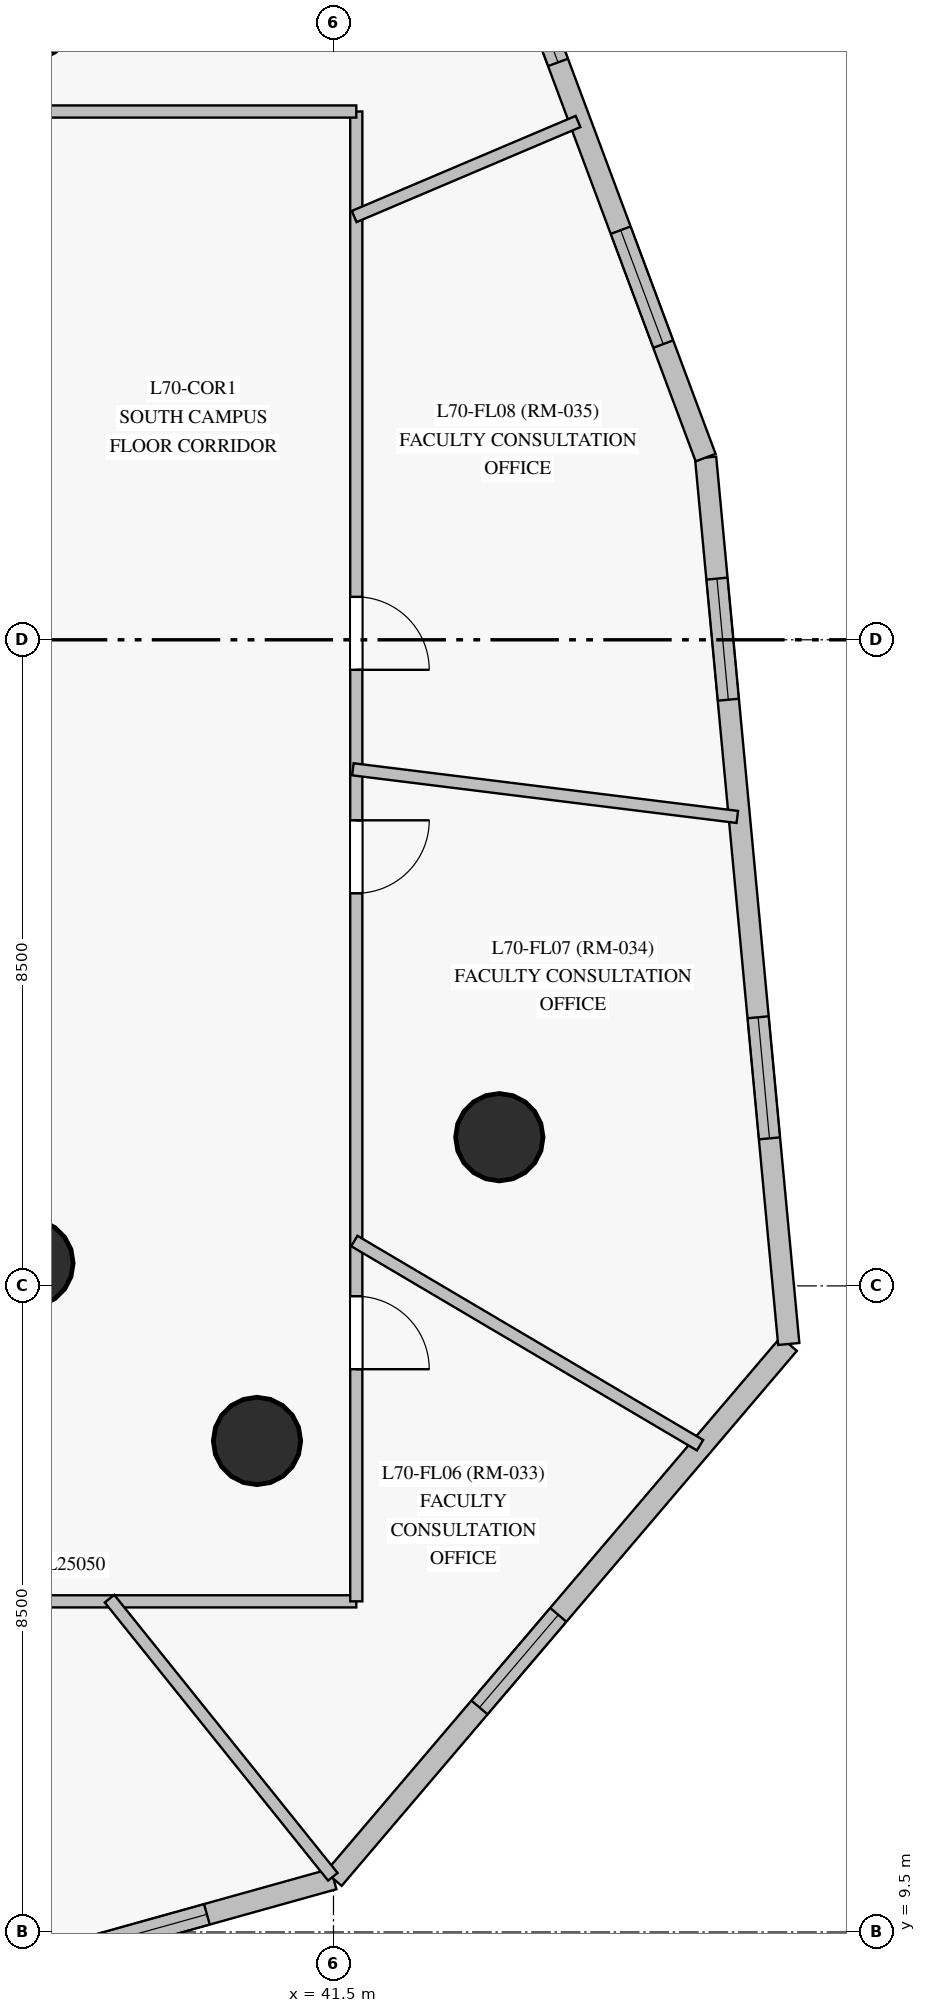
"""IFC4 building model, lengths in metres.
Left out: names, types, materials, properties, quantities, classifications, styles, units other than length and angle.
Written with IfcOpenShell. Run it as: python <this file> out.ifc"""

import sys

from ifc_helpers import new_model, si_unit, direction, frame, frame_2d, origin, origin_with_axes, origin_2d, place, context, subcontext, project, spatial, rectangle, circle, extrude, source, transform, mapped, element, fill, save


model = new_model("IFC4")
c1 = context("Model", 3, precision=1e-05, world=origin(), true_north=direction((0.0, 1.0)))
c2 = subcontext(c1, "Body", "Model", "MODEL_VIEW")
j1 = project(units=[si_unit("LENGTHUNIT", "METRE"), si_unit("PLANEANGLEUNIT", "RADIAN")], contexts=[c1])
p1 = place(None, origin())
s1 = spatial("IfcSite", under=j1, at=p1, CompositionType="ELEMENT")
p2 = place(p1, origin())
s2 = spatial("IfcBuilding", under=s1, at=p2, CompositionType="ELEMENT")
p3 = place(p2, frame((0.0, 0.0, 238.25)))
s3 = spatial("IfcBuildingStorey", under=s2, at=p3, CompositionType="ELEMENT", Elevation=238.25)
m1 = source(origin_with_axes(), c2, "Body", "SweptSolid", [
    extrude(circle(Radius=0.575, at=origin_2d()), origin(), (0.0, 0.0, 1.0), 3.05),
])
for number, where, z_axis, x_axis in (
    (1, (37.5, 18.3, 0.0), (0.0, 0.0, 1.0), (1.0, 0.0, 0.0)),
    (2, (37.5, 34.7, 0.0), (0.0, 0.0, 1.0), (1.0, 0.0, 0.0)),
    (3, (43.682, 19.956, 0.0), (0.0, 0.0, 1.0), (1.0, 0.0, 0.0)),
    (4, (40.494, 15.96, 0.0), (0.0, 0.0, 1.0), (1.0, 0.0, 0.0)),
):
    element("IfcColumn", number, at=place(p3, frame(where, z_axis=z_axis, x_axis=x_axis)), inside=s3, PredefinedType="COLUMN", context=c2, shape_type="MappedRepresentation", body=[
        mapped(m1, transform((0.0, 0.0, 0.0), scale=1.0)),
    ])
p4 = place(p3, frame((29.601, 6.876, 0.0), z_axis=(0.0, 0.0, 1.0), x_axis=(0.963188210112, 0.268827959673, 0.0)))
e5 = element("IfcWall", 5, at=p4, inside=s3, PredefinedType="SOLIDWALL", context=c2, shape_type="SweptSolid", body=[
    extrude(rectangle(XDim=12.355, YDim=0.28, at=frame_2d((6.177, 0.0))), origin(), (0.0, 0.0, 1.0), 2.85),
])
p5 = place(p4, frame((0.757, 0.0, 0.85)))
e6 = element("IfcOpeningElement", 6, at=p5, cuts=e5, PredefinedType="OPENING", context=c2, shape_type="SweptSolid", body=[
    extrude(rectangle(XDim=1.6, YDim=1.6, at=frame_2d((0.8, 0.8))), frame((0.0, 0.15, 0.0), z_axis=(0.0, -1.0, 0.0), x_axis=(1.0, 0.0, 0.0)), (0.0, 0.0, 1.0), 0.3),
])
p6 = place(p4, frame((4.725, 0.0, 0.85)))
e7 = element("IfcOpeningElement", 7, at=p6, cuts=e5, PredefinedType="OPENING", context=c2, shape_type="SweptSolid", body=[
    extrude(rectangle(XDim=1.6, YDim=1.6, at=frame_2d((0.8, 0.8))), frame((0.0, 0.15, 0.0), z_axis=(0.0, -1.0, 0.0), x_axis=(1.0, 0.0, 0.0)), (0.0, 0.0, 1.0), 0.3),
])
p7 = place(p4, frame((9.025, 0.0, 0.85)))
e8 = element("IfcOpeningElement", 8, at=p7, cuts=e5, PredefinedType="OPENING", context=c2, shape_type="SweptSolid", body=[
    extrude(rectangle(XDim=1.6, YDim=1.6, at=frame_2d((0.8, 0.8))), frame((0.0, 0.15, 0.0), z_axis=(0.0, -1.0, 0.0), x_axis=(1.0, 0.0, 0.0)), (0.0, 0.0, 1.0), 0.3),
])
p8 = place(p3, frame((41.501, 10.198, 0.0), z_axis=(0.0, 0.0, 1.0), x_axis=(0.648021806958, 0.761621781271, 0.0)))
e9 = element("IfcWall", 9, at=p8, inside=s3, PredefinedType="SOLIDWALL", context=c2, shape_type="SweptSolid", body=[
    extrude(rectangle(XDim=9.241, YDim=0.28, at=frame_2d((4.621, 0.0))), origin(), (0.0, 0.0, 1.0), 2.85),
])
p9 = place(p8, frame((2.962, 0.0, 0.85)))
e10 = element("IfcOpeningElement", 10, at=p9, cuts=e9, PredefinedType="OPENING", context=c2, shape_type="SweptSolid", body=[
    extrude(rectangle(XDim=1.6, YDim=1.6, at=frame_2d((0.8, 0.8))), frame((0.0, 0.15, 0.0), z_axis=(0.0, -1.0, 0.0), x_axis=(1.0, 0.0, 0.0)), (0.0, 0.0, 1.0), 0.3),
])
p10 = place(p3, frame((47.49, 17.236, 0.0), z_axis=(0.0, 0.0, 1.0), x_axis=(-0.093386555956, 0.995629926814, 0.0)))
e11 = element("IfcWall", 11, at=p10, inside=s3, PredefinedType="SOLIDWALL", context=c2, shape_type="SweptSolid", body=[
    extrude(rectangle(XDim=11.712, YDim=0.28, at=frame_2d((5.856, 0.0))), origin(), (0.0, 0.0, 1.0), 2.85),
])
p11 = place(p10, frame((2.717, 0.0, 0.85)))
e12 = element("IfcOpeningElement", 12, at=p11, cuts=e11, PredefinedType="OPENING", context=c2, shape_type="SweptSolid", body=[
    extrude(rectangle(XDim=1.6, YDim=1.6, at=frame_2d((0.8, 0.8))), frame((0.0, 0.15, 0.0), z_axis=(0.0, -1.0, 0.0), x_axis=(1.0, 0.0, 0.0)), (0.0, 0.0, 1.0), 0.3),
])
p12 = place(p10, frame((8.513, 0.0, 0.85)))
e13 = element("IfcOpeningElement", 13, at=p12, cuts=e11, PredefinedType="OPENING", context=c2, shape_type="SweptSolid", body=[
    extrude(rectangle(XDim=1.6, YDim=1.6, at=frame_2d((0.8, 0.8))), frame((0.0, 0.15, 0.0), z_axis=(0.0, -1.0, 0.0), x_axis=(1.0, 0.0, 0.0)), (0.0, 0.0, 1.0), 0.3),
])
p13 = place(p3, frame((46.396, 28.897, 0.0), z_axis=(0.0, 0.0, 1.0), x_axis=(-0.34987402961, 0.936796756722, 0.0)))
e14 = element("IfcWall", 14, at=p13, inside=s3, PredefinedType="SOLIDWALL", context=c2, shape_type="SweptSolid", body=[
    extrude(rectangle(XDim=8.032, YDim=0.28, at=frame_2d((4.016, 0.0))), origin(), (0.0, 0.0, 1.0), 2.85),
])
p14 = place(p13, frame((1.594, 0.0, 0.85)))
e15 = element("IfcOpeningElement", 15, at=p14, cuts=e14, PredefinedType="OPENING", context=c2, shape_type="SweptSolid", body=[
    extrude(rectangle(XDim=1.6, YDim=1.6, at=frame_2d((0.8, 0.8))), frame((0.0, 0.15, 0.0), z_axis=(0.0, -1.0, 0.0), x_axis=(1.0, 0.0, 0.0)), (0.0, 0.0, 1.0), 0.3),
])
p15 = place(p13, frame((5.55, 0.0, 0.85)))
e16 = element("IfcOpeningElement", 16, at=p15, cuts=e14, PredefinedType="OPENING", context=c2, shape_type="SweptSolid", body=[
    extrude(rectangle(XDim=1.6, YDim=1.6, at=frame_2d((0.8, 0.8))), frame((0.0, 0.15, 0.0), z_axis=(0.0, -1.0, 0.0), x_axis=(1.0, 0.0, 0.0)), (0.0, 0.0, 1.0), 0.3),
])
p16 = place(p3, frame((41.8, 13.85, 0.0), z_axis=(0.0, 0.0, 1.0), x_axis=(-1.0, 0.0, 0.0)))
e17 = element("IfcWall", 17, at=p16, inside=s3, PredefinedType="PARTITIONING", context=c2, shape_type="SweptSolid", body=[
    extrude(rectangle(XDim=25.05, YDim=0.16, at=frame_2d((12.525, 0.0))), origin(), (0.0, 0.0, 1.0), 2.3),
])
p17 = place(p16, frame((18.312, 0.0, 0.0)))
e18 = element("IfcOpeningElement", 18, at=p17, cuts=e17, PredefinedType="OPENING", context=c2, shape_type="SweptSolid", body=[
    extrude(rectangle(XDim=0.96, YDim=2.15, at=frame_2d((0.48, 1.075))), frame((0.0, 0.09, 0.0), z_axis=(0.0, -1.0, 0.0), x_axis=(1.0, 0.0, 0.0)), (0.0, 0.0, 1.0), 0.18),
])
p18 = place(p16, frame((12.05, 0.0, 0.0)))
e19 = element("IfcOpeningElement", 19, at=p18, cuts=e17, PredefinedType="OPENING", context=c2, shape_type="SweptSolid", body=[
    extrude(rectangle(XDim=0.96, YDim=2.15, at=frame_2d((0.48, 1.075))), frame((0.0, 0.09, 0.0), z_axis=(0.0, -1.0, 0.0), x_axis=(1.0, 0.0, 0.0)), (0.0, 0.0, 1.0), 0.18),
])
p19 = place(p16, frame((8.292, 0.0, 0.0)))
e20 = element("IfcOpeningElement", 20, at=p19, cuts=e17, PredefinedType="OPENING", context=c2, shape_type="SweptSolid", body=[
    extrude(rectangle(XDim=0.96, YDim=2.15, at=frame_2d((0.48, 1.075))), frame((0.0, 0.09, 0.0), z_axis=(0.0, -1.0, 0.0), x_axis=(1.0, 0.0, 0.0)), (0.0, 0.0, 1.0), 0.18),
])
p20 = place(p3, frame((41.8, 33.45, 0.0), z_axis=(0.0, 0.0, 1.0), x_axis=(0.0, -1.0, 0.0)))
e21 = element("IfcWall", 21, at=p20, inside=s3, PredefinedType="PARTITIONING", context=c2, shape_type="SweptSolid", body=[
    extrude(rectangle(XDim=19.6, YDim=0.16, at=frame_2d((9.8, 0.0))), origin(), (0.0, 0.0, 1.0), 2.3),
])
p21 = place(p20, frame((15.586, 0.0, 0.0)))
e22 = element("IfcOpeningElement", 22, at=p21, cuts=e21, PredefinedType="OPENING", context=c2, shape_type="SweptSolid", body=[
    extrude(rectangle(XDim=0.96, YDim=2.15, at=frame_2d((0.48, 1.075))), frame((0.0, 0.09, 0.0), z_axis=(0.0, -1.0, 0.0), x_axis=(1.0, 0.0, 0.0)), (0.0, 0.0, 1.0), 0.18),
])
p22 = place(p20, frame((9.325, 0.0, 0.0)))
e23 = element("IfcOpeningElement", 23, at=p22, cuts=e21, PredefinedType="OPENING", context=c2, shape_type="SweptSolid", body=[
    extrude(rectangle(XDim=0.96, YDim=2.15, at=frame_2d((0.48, 1.075))), frame((0.0, 0.09, 0.0), z_axis=(0.0, -1.0, 0.0), x_axis=(1.0, 0.0, 0.0)), (0.0, 0.0, 1.0), 0.18),
])
p23 = place(p20, frame((6.385, 0.0, 0.0)))
e24 = element("IfcOpeningElement", 24, at=p23, cuts=e21, PredefinedType="OPENING", context=c2, shape_type="SweptSolid", body=[
    extrude(rectangle(XDim=0.96, YDim=2.15, at=frame_2d((0.48, 1.075))), frame((0.0, 0.09, 0.0), z_axis=(0.0, -1.0, 0.0), x_axis=(1.0, 0.0, 0.0)), (0.0, 0.0, 1.0), 0.18),
])
p24 = place(p3, frame((41.774, 18.591, 0.0), z_axis=(0.0, 0.0, 1.0), x_axis=(0.861040600517, -0.508536217256, 0.0)))
e25 = element("IfcWall", 25, at=p24, inside=s3, PredefinedType="PARTITIONING", context=c2, shape_type="SweptSolid", body=[
    extrude(rectangle(XDim=5.282, YDim=0.16, at=frame_2d((2.641, 0.0))), origin(), (0.0, 0.0, 1.0), 2.85),
])
p25 = place(p3, frame((41.755, 24.796, 0.0), z_axis=(0.0, 0.0, 1.0), x_axis=(0.992404123025, -0.123020553578, 0.0)))
e26 = element("IfcWall", 26, at=p25, inside=s3, PredefinedType="PARTITIONING", context=c2, shape_type="SweptSolid", body=[
    extrude(rectangle(XDim=5.096, YDim=0.16, at=frame_2d((2.548, 0.0))), origin(), (0.0, 0.0, 1.0), 2.85),
])
p26 = place(p3, frame((38.553, 13.885, 0.0), z_axis=(0.0, 0.0, 1.0), x_axis=(0.626159620149, -0.779694895517, 0.0)))
e27 = element("IfcWall", 27, at=p26, inside=s3, PredefinedType="PARTITIONING", context=c2, shape_type="SweptSolid", body=[
    extrude(rectangle(XDim=4.692, YDim=0.16, at=frame_2d((2.346, 0.0))), origin(), (0.0, 0.0, 1.0), 2.85),
])
p27 = place(p3, frame((37.682, 33.45, 0.0), z_axis=(0.0, 0.0, 1.0), x_axis=(1.0, 0.0, 0.0)))
e28 = element("IfcWall", 28, at=p27, inside=s3, PredefinedType="PARTITIONING", context=c2, shape_type="SweptSolid", body=[
    extrude(rectangle(XDim=4.118, YDim=0.16, at=frame_2d((2.059, 0.0))), origin(), (0.0, 0.0, 1.0), 2.85),
])
p28 = place(p3, frame((41.772, 32.069, 0.0), z_axis=(0.0, 0.0, 1.0), x_axis=(0.92048947537, 0.390767355, 0.0)))
e29 = element("IfcWall", 29, at=p28, inside=s3, PredefinedType="PARTITIONING", context=c2, shape_type="SweptSolid", body=[
    extrude(rectangle(XDim=3.199, YDim=0.16, at=frame_2d((1.6, 0.0))), origin(), (0.0, 0.0, 1.0), 2.85),
])
m2 = source(origin_with_axes(), c2, "Body", "SweptSolid", [
    extrude(rectangle(XDim=1.6, YDim=1.6, at=frame_2d((0.8, 0.8))), frame((0.0, 0.03, 0.0), z_axis=(0.0, -1.0, 0.0), x_axis=(1.0, 0.0, 0.0)), (0.0, 0.0, 1.0), 0.06),
])
p29 = place(p7, origin())
e30 = element("IfcWindow", 30, at=p29, inside=s3, PartitioningType="SINGLE_PANEL", PredefinedType="WINDOW", context=c2, shape_type="MappedRepresentation", body=[
    mapped(m2, transform((0.0, 0.0, 0.0), scale=1.0)),
])
fill(e8, e30)
p30 = place(p9, origin())
e31 = element("IfcWindow", 31, at=p30, inside=s3, PartitioningType="SINGLE_PANEL", PredefinedType="WINDOW", context=c2, shape_type="MappedRepresentation", body=[
    mapped(m2, transform((0.0, 0.0, 0.0), scale=1.0)),
])
fill(e10, e31)
p31 = place(p11, origin())
e32 = element("IfcWindow", 32, at=p31, inside=s3, PartitioningType="SINGLE_PANEL", PredefinedType="WINDOW", context=c2, shape_type="MappedRepresentation", body=[
    mapped(m2, transform((0.0, 0.0, 0.0), scale=1.0)),
])
fill(e12, e32)
p32 = place(p12, origin())
e33 = element("IfcWindow", 33, at=p32, inside=s3, PartitioningType="SINGLE_PANEL", PredefinedType="WINDOW", context=c2, shape_type="MappedRepresentation", body=[
    mapped(m2, transform((0.0, 0.0, 0.0), scale=1.0)),
])
fill(e13, e33)
p33 = place(p14, origin())
e34 = element("IfcWindow", 34, at=p33, inside=s3, PartitioningType="SINGLE_PANEL", PredefinedType="WINDOW", context=c2, shape_type="MappedRepresentation", body=[
    mapped(m2, transform((0.0, 0.0, 0.0), scale=1.0)),
])
fill(e15, e34)
p34 = place(p15, origin())
e35 = element("IfcWindow", 35, at=p34, inside=s3, PartitioningType="SINGLE_PANEL", PredefinedType="WINDOW", context=c2, shape_type="MappedRepresentation", body=[
    mapped(m2, transform((0.0, 0.0, 0.0), scale=1.0)),
])
fill(e16, e35)
m3 = source(origin_with_axes(), c2, "Body", "SweptSolid", [
    extrude(rectangle(XDim=0.96, YDim=2.15, at=frame_2d((0.48, 1.075))), frame((0.0, 0.025, 0.0), z_axis=(0.0, -1.0, 0.0), x_axis=(1.0, 0.0, 0.0)), (0.0, 0.0, 1.0), 0.05),
])
p35 = place(p21, origin())
e36 = element("IfcDoor", 36, at=p35, inside=s3, OperationType="SINGLE_SWING_RIGHT", PredefinedType="DOOR", context=c2, shape_type="MappedRepresentation", body=[
    mapped(m3, transform((0.0, 0.0, 0.0), scale=1.0)),
])
fill(e22, e36)
p36 = place(p22, origin())
e37 = element("IfcDoor", 37, at=p36, inside=s3, OperationType="SINGLE_SWING_LEFT", PredefinedType="DOOR", context=c2, shape_type="MappedRepresentation", body=[
    mapped(m3, transform((0.0, 0.0, 0.0), scale=1.0)),
])
fill(e23, e37)
p37 = place(p23, origin())
e38 = element("IfcDoor", 38, at=p37, inside=s3, OperationType="SINGLE_SWING_RIGHT", PredefinedType="DOOR", context=c2, shape_type="MappedRepresentation", body=[
    mapped(m3, transform((0.0, 0.0, 0.0), scale=1.0)),
])
fill(e24, e38)
save(model, sys.argv[1])
